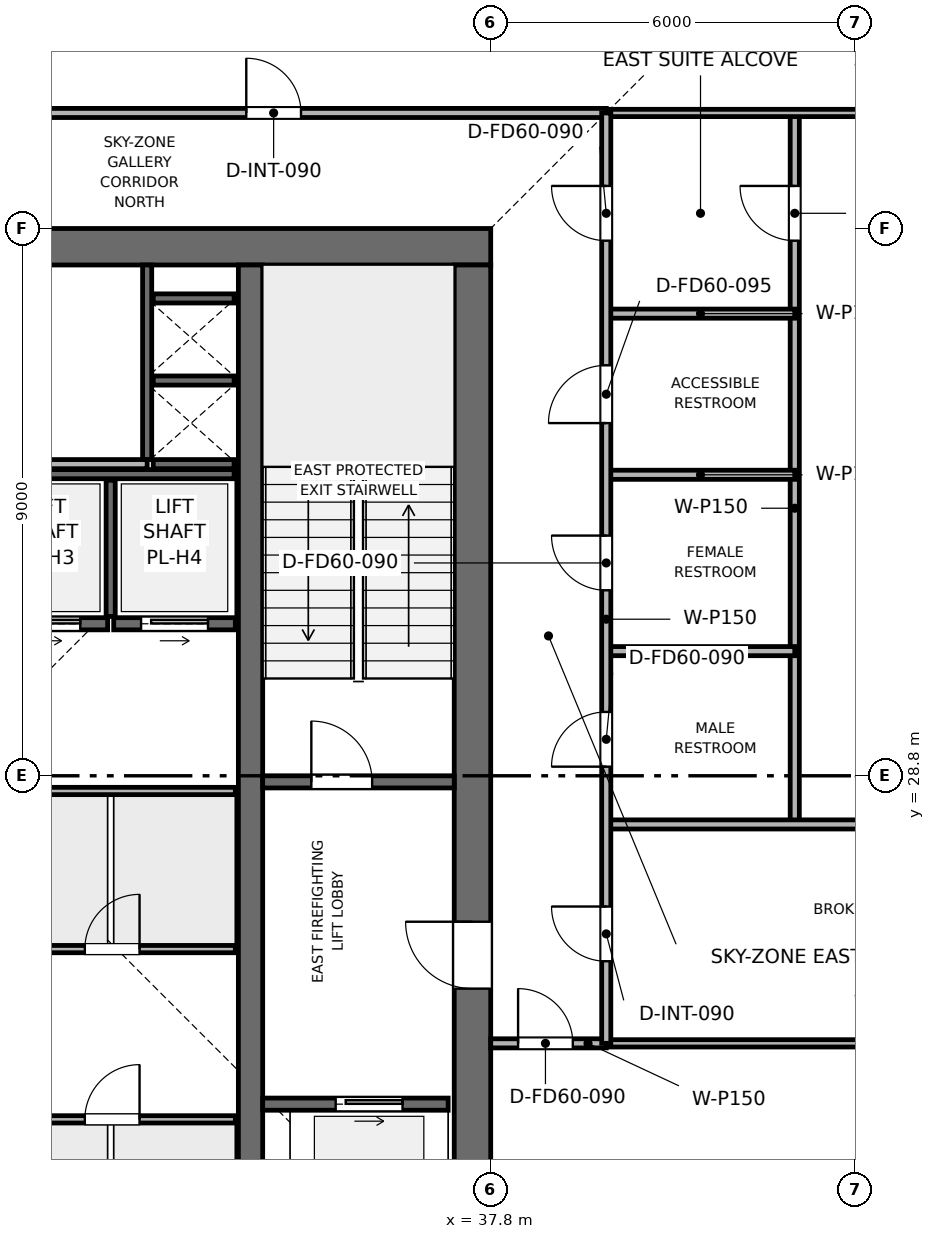
"""IFC4 building model, lengths in metres.
Left out: names, types, materials, properties, quantities, classifications, styles, units other than length and angle.
Written with IfcOpenShell. Run it as: python <this file> out.ifc"""

import sys

from ifc_helpers import new_model, si_unit, direction, frame, frame_2d, origin, place, context, subcontext, project, spatial, rectangle, extrude, element, fill, save


model = new_model("IFC4")
c1 = context("Model", 3, precision=1e-05, world=origin(), true_north=direction((0.0, 1.0)))
c2 = subcontext(c1, "Body", "Model", "MODEL_VIEW")
j1 = project(units=[si_unit("LENGTHUNIT", "METRE"), si_unit("PLANEANGLEUNIT", "RADIAN")], contexts=[c1])
p1 = place(None, origin())
s1 = spatial("IfcSite", under=j1, at=p1, CompositionType="ELEMENT")
p2 = place(p1, origin())
s2 = spatial("IfcBuilding", under=s1, at=p2, CompositionType="ELEMENT")
p3 = place(p2, frame((0.0, 0.0, 355.5)))
s3 = spatial("IfcBuildingStorey", under=s2, at=p3, CompositionType="ELEMENT", Elevation=355.5)
p4 = place(p3, frame((19.8, 37.5, 0.0), z_axis=(0.0, 0.0, 1.0), x_axis=(1.0, 0.0, 0.0)))
e1 = element("IfcWall", 1, at=p4, inside=s3, PredefinedType="SHEAR", context=c2, shape_type="SweptSolid", body=[
    extrude(rectangle(XDim=18.0, YDim=0.6, at=frame_2d((9.0, 0.0))), origin(), (0.0, 0.0, 1.0), 4.5),
])
p5 = place(p4, frame((7.05, 0.0, 0.0)))
e2 = element("IfcOpeningElement", 2, at=p5, cuts=e1, PredefinedType="OPENING", context=c2, shape_type="SweptSolid", body=[
    extrude(rectangle(XDim=1.1, YDim=2.15, at=frame_2d((0.55, 1.075))), frame((0.0, 0.31, 0.0), z_axis=(0.0, -1.0, 0.0), x_axis=(1.0, 0.0, 0.0)), (0.0, 0.0, 1.0), 0.62),
])
p6 = place(p3, frame((37.5, 20.4, 0.0), z_axis=(0.0, 0.0, 1.0), x_axis=(0.0, 1.0, 0.0)))
e3 = element("IfcWall", 3, at=p6, inside=s3, PredefinedType="SHEAR", context=c2, shape_type="SweptSolid", body=[
    extrude(rectangle(XDim=16.8, YDim=0.6, at=frame_2d((8.4, 0.0))), origin(), (0.0, 0.0, 1.0), 4.5),
])
p7 = place(p6, frame((4.9, 0.0, 0.0)))
e4 = element("IfcOpeningElement", 4, at=p7, cuts=e3, PredefinedType="OPENING", context=c2, shape_type="SweptSolid", body=[
    extrude(rectangle(XDim=1.1, YDim=2.15, at=frame_2d((0.55, 1.075))), frame((0.0, 0.31, 0.0), z_axis=(0.0, -1.0, 0.0), x_axis=(1.0, 0.0, 0.0)), (0.0, 0.0, 1.0), 0.62),
])
p8 = place(p3, frame((33.85, 20.4, 0.0), z_axis=(0.0, 0.0, 1.0), x_axis=(0.0, 1.0, 0.0)))
e5 = element("IfcWall", 5, at=p8, inside=s3, PredefinedType="SHEAR", context=c2, shape_type="SweptSolid", body=[
    extrude(rectangle(XDim=16.8, YDim=0.4, at=frame_2d((8.4, 0.0))), origin(), (0.0, 0.0, 1.0), 4.5),
])
p9 = place(p3, frame((34.05, 28.7, 0.0), z_axis=(0.0, 0.0, 1.0), x_axis=(1.0, 0.0, 0.0)))
e6 = element("IfcWall", 6, at=p9, inside=s3, PredefinedType="SHEAR", context=c2, shape_type="SweptSolid", body=[
    extrude(rectangle(XDim=3.15, YDim=0.2, at=frame_2d((1.575, 0.0))), origin(), (0.0, 0.0, 1.0), 4.24),
])
p10 = place(p9, frame((0.8, 0.0, 0.0)))
e7 = element("IfcOpeningElement", 7, at=p10, cuts=e6, PredefinedType="OPENING", context=c2, shape_type="SweptSolid", body=[
    extrude(rectangle(XDim=1.0, YDim=2.1, at=frame_2d((0.5, 1.05))), frame((0.0, 0.11, 0.0), z_axis=(0.0, -1.0, 0.0), x_axis=(1.0, 0.0, 0.0)), (0.0, 0.0, 1.0), 0.22),
])
p11 = place(p3, frame((32.15, 34.0, 0.0), z_axis=(0.0, 0.0, 1.0), x_axis=(0.0, 1.0, 0.0)))
e8 = element("IfcWall", 8, at=p11, inside=s3, PredefinedType="SHEAR", context=c2, shape_type="SweptSolid", body=[
    extrude(rectangle(XDim=3.2, YDim=0.15, at=frame_2d((1.6, 0.0))), origin(), (0.0, 0.0, 1.0), 4.24),
])
for number, where, z_axis, x_axis in (
    (9, (32.25, 33.925, 0.0), (0.0, 0.0, 1.0), (1.0, 0.0, 0.0)),
    (10, (32.25, 35.3, 0.0), (0.0, 0.0, 1.0), (1.0, 0.0, 0.0)),
):
    element("IfcWall", number, at=place(p3, frame(where, z_axis=z_axis, x_axis=x_axis)), inside=s3, PredefinedType="SHEAR", context=c2, shape_type="SweptSolid", body=[
        extrude(rectangle(XDim=1.33, YDim=0.15, at=frame_2d((0.665, 0.0))), origin(), (0.0, 0.0, 1.0), 4.24),
    ])
p12 = place(p3, frame((34.05, 23.4, 0.0), z_axis=(0.0, 0.0, 1.0), x_axis=(1.0, 0.0, 0.0)))
e11 = element("IfcWall", 11, at=p12, inside=s3, PredefinedType="SHEAR", context=c2, shape_type="SweptSolid", body=[
    extrude(rectangle(XDim=3.05, YDim=0.2, at=frame_2d((1.525, 0.0))), origin(), (0.0, 0.0, 1.0), 4.24),
])
p13 = place(p12, frame((1.2, 0.0, 0.0)))
e12 = element("IfcOpeningElement", 12, at=p13, cuts=e11, PredefinedType="OPENING", context=c2, shape_type="SweptSolid", body=[
    extrude(rectangle(XDim=1.1, YDim=2.15, at=frame_2d((0.55, 1.075))), frame((0.0, 0.11, 0.0), z_axis=(0.0, -1.0, 0.0), x_axis=(1.0, 0.0, 0.0)), (0.0, 0.0, 1.0), 0.22),
])
p14 = place(p3, frame((29.5, 31.3, 0.0), z_axis=(0.0, 0.0, 1.0), x_axis=(1.0, 0.0, 0.0)))
e13 = element("IfcWall", 13, at=p14, inside=s3, PredefinedType="SHEAR", context=c2, shape_type="SweptSolid", body=[
    extrude(rectangle(XDim=2.0, YDim=0.2, at=frame_2d((1.0, 0.0))), origin(), (0.0, 0.0, 1.0), 4.24),
])
p15 = place(p14, frame((0.45, 0.0, 0.0)))
e14 = element("IfcOpeningElement", 14, at=p15, cuts=e13, PredefinedType="OPENING", context=c2, shape_type="SweptSolid", body=[
    extrude(rectangle(XDim=1.1, YDim=2.15, at=frame_2d((0.55, 1.075))), frame((0.0, 0.11, 0.0), z_axis=(0.0, -1.0, 0.0), x_axis=(1.0, 0.0, 0.0)), (0.0, 0.0, 1.0), 0.22),
])
p16 = place(p3, frame((31.6, 31.3, 0.0), z_axis=(0.0, 0.0, 1.0), x_axis=(1.0, 0.0, 0.0)))
e15 = element("IfcWall", 15, at=p16, inside=s3, PredefinedType="SHEAR", context=c2, shape_type="SweptSolid", body=[
    extrude(rectangle(XDim=2.0, YDim=0.2, at=frame_2d((1.0, 0.0))), origin(), (0.0, 0.0, 1.0), 4.24),
])
p17 = place(p16, frame((0.45, 0.0, 0.0)))
e16 = element("IfcOpeningElement", 16, at=p17, cuts=e15, PredefinedType="OPENING", context=c2, shape_type="SweptSolid", body=[
    extrude(rectangle(XDim=1.1, YDim=2.15, at=frame_2d((0.55, 1.075))), frame((0.0, 0.11, 0.0), z_axis=(0.0, -1.0, 0.0), x_axis=(1.0, 0.0, 0.0)), (0.0, 0.0, 1.0), 0.22),
])
p18 = place(p3, frame((32.25, 36.65, 0.0), z_axis=(0.0, 0.0, 1.0), x_axis=(1.0, 0.0, 0.0)))
e17 = element("IfcWall", 17, at=p18, inside=s3, PredefinedType="SHEAR", context=c2, shape_type="SweptSolid", body=[
    extrude(rectangle(XDim=1.33, YDim=0.15, at=frame_2d((0.665, 0.0))), origin(), (0.0, 0.0, 1.0), 4.24),
])
p19 = place(p3, frame((29.5, 33.76, 0.0), z_axis=(0.0, 0.0, 1.0), x_axis=(1.0, 0.0, 0.0)))
e18 = element("IfcWall", 18, at=p19, inside=s3, PredefinedType="SHEAR", context=c2, shape_type="SweptSolid", body=[
    extrude(rectangle(XDim=4.08, YDim=0.15, at=frame_2d((2.04, 0.0))), origin(), (0.0, 0.0, 1.0), 4.24),
])
p20 = place(p3, frame((31.55, 31.42, 0.0), z_axis=(0.0, 0.0, 1.0), x_axis=(0.0, 1.0, 0.0)))
e19 = element("IfcWall", 19, at=p20, inside=s3, PredefinedType="SHEAR", context=c2, shape_type="SweptSolid", body=[
    extrude(rectangle(XDim=2.24, YDim=0.15, at=frame_2d((1.12, 0.0))), origin(), (0.0, 0.0, 1.0), 4.24),
])
p21 = place(p3, frame((29.525, 33.925, 0.0), z_axis=(0.0, 0.0, 1.0), x_axis=(1.0, 0.0, 0.0)))
e20 = element("IfcWall", 20, at=p21, inside=s3, PredefinedType="PARTITIONING", context=c2, shape_type="SweptSolid", body=[
    extrude(rectangle(XDim=2.625, YDim=0.15, at=frame_2d((1.312, 0.0))), origin(), (0.0, 0.0, 1.0), 4.24),
])
p22 = place(p3, frame((29.55, 23.15, 0.0), z_axis=(0.0, 0.0, 1.0), x_axis=(1.0, 0.0, 0.0)))
e21 = element("IfcWall", 21, at=p22, inside=s3, PredefinedType="PARTITIONING", context=c2, shape_type="SweptSolid", body=[
    extrude(rectangle(XDim=4.05, YDim=0.12, at=frame_2d((2.025, 0.0))), origin(), (0.0, 0.0, 1.0), 4.24),
])
p23 = place(p22, frame((1.575, 0.0, 0.0)))
e22 = element("IfcOpeningElement", 22, at=p23, cuts=e21, PredefinedType="OPENING", context=c2, shape_type="SweptSolid", body=[
    extrude(rectangle(XDim=0.9, YDim=2.1, at=frame_2d((0.45, 1.05))), frame((0.0, 0.07, 0.0), z_axis=(0.0, -1.0, 0.0), x_axis=(1.0, 0.0, 0.0)), (0.0, 0.0, 1.0), 0.14),
])
p24 = place(p3, frame((29.55, 25.95, 0.0), z_axis=(0.0, 0.0, 1.0), x_axis=(1.0, 0.0, 0.0)))
e23 = element("IfcWall", 23, at=p24, inside=s3, PredefinedType="PARTITIONING", context=c2, shape_type="SweptSolid", body=[
    extrude(rectangle(XDim=4.05, YDim=0.12, at=frame_2d((2.025, 0.0))), origin(), (0.0, 0.0, 1.0), 4.24),
])
p25 = place(p24, frame((1.575, 0.0, 0.0)))
e24 = element("IfcOpeningElement", 24, at=p25, cuts=e23, PredefinedType="OPENING", context=c2, shape_type="SweptSolid", body=[
    extrude(rectangle(XDim=0.9, YDim=2.1, at=frame_2d((0.45, 1.05))), frame((0.0, 0.07, 0.0), z_axis=(0.0, -1.0, 0.0), x_axis=(1.0, 0.0, 0.0)), (0.0, 0.0, 1.0), 0.14),
])
p26 = place(p3, frame((29.55, 28.55, 0.0), z_axis=(0.0, 0.0, 1.0), x_axis=(1.0, 0.0, 0.0)))
e25 = element("IfcWall", 25, at=p26, inside=s3, PredefinedType="PARTITIONING", context=c2, shape_type="SweptSolid", body=[
    extrude(rectangle(XDim=4.05, YDim=0.12, at=frame_2d((2.025, 0.0))), origin(), (0.0, 0.0, 1.0), 4.24),
])
p27 = place(p3, frame((37.8, 24.4, 0.0), z_axis=(0.0, 0.0, 1.0), x_axis=(1.0, 0.0, 0.0)))
e26 = element("IfcWall", 26, at=p27, inside=s3, PredefinedType="PARTITIONING", context=c2, shape_type="SweptSolid", body=[
    extrude(rectangle(XDim=1.9, YDim=0.15, at=frame_2d((0.95, 0.0))), origin(), (0.0, 0.0, 1.0), 4.24),
])
p28 = place(p27, frame((0.45, 0.0, 0.0)))
e27 = element("IfcOpeningElement", 27, at=p28, cuts=e26, PredefinedType="OPENING", context=c2, shape_type="SweptSolid", body=[
    extrude(rectangle(XDim=0.9, YDim=2.1, at=frame_2d((0.45, 1.05))), frame((0.0, 0.085, 0.0), z_axis=(0.0, -1.0, 0.0), x_axis=(1.0, 0.0, 0.0)), (0.0, 0.0, 1.0), 0.17),
])
p29 = place(p3, frame((39.7, 24.4, 0.0), z_axis=(0.0, 0.0, 1.0), x_axis=(1.0, 0.0, 0.0)))
e28 = element("IfcWall", 28, at=p29, inside=s3, PredefinedType="PARTITIONING", context=c2, shape_type="SweptSolid", body=[
    extrude(rectangle(XDim=9.37, YDim=0.12, at=frame_2d((4.685, 0.0))), origin(), (0.0, 0.0, 1.0), 3.865),
])
p30 = place(p3, frame((42.8, 28.0, 0.0), z_axis=(0.0, 0.0, 1.0), x_axis=(0.0, 1.0, 0.0)))
e29 = element("IfcWall", 29, at=p30, inside=s3, PredefinedType="PARTITIONING", context=c2, shape_type="SweptSolid", body=[
    extrude(rectangle(XDim=11.7, YDim=0.15, at=frame_2d((5.85, 0.0))), origin(), (0.0, 0.0, 1.0), 3.825),
])
p31 = place(p30, frame((9.6, 0.0, 0.0)))
e30 = element("IfcOpeningElement", 30, at=p31, cuts=e29, PredefinedType="OPENING", context=c2, shape_type="SweptSolid", body=[
    extrude(rectangle(XDim=0.9, YDim=2.1, at=frame_2d((0.45, 1.05))), frame((0.0, 0.085, 0.0), z_axis=(0.0, -1.0, 0.0), x_axis=(1.0, 0.0, 0.0)), (0.0, 0.0, 1.0), 0.17),
])
p32 = place(p3, frame((39.7, 28.0, 0.0), z_axis=(0.0, 0.0, 1.0), x_axis=(1.0, 0.0, 0.0)))
e31 = element("IfcWall", 31, at=p32, inside=s3, PredefinedType="PARTITIONING", context=c2, shape_type="SweptSolid", body=[
    extrude(rectangle(XDim=9.37, YDim=0.15, at=frame_2d((4.685, 0.0))), origin(), (0.0, 0.0, 1.0), 3.865),
])
for number, where, z_axis, x_axis in (
    (32, (39.7, 36.4, 0.0), (0.0, 0.0, 1.0), (1.0, 0.0, 0.0)),
    (33, (39.7, 30.85, 0.0), (0.0, 0.0, 1.0), (1.0, 0.0, 0.0)),
    (34, (39.7, 33.75, 0.0), (0.0, 0.0, 1.0), (1.0, 0.0, 0.0)),
):
    element("IfcWall", number, at=place(p3, frame(where, z_axis=z_axis, x_axis=x_axis)), inside=s3, PredefinedType="PARTITIONING", context=c2, shape_type="SweptSolid", body=[
        extrude(rectangle(XDim=3.1, YDim=0.15, at=frame_2d((1.55, 0.0))), origin(), (0.0, 0.0, 1.0), 3.865),
    ])
p33 = place(p3, frame((39.7, 39.7, 0.0), z_axis=(0.0, 0.0, 1.0), x_axis=(1.0, 0.0, 0.0)))
e35 = element("IfcWall", 35, at=p33, inside=s3, PredefinedType="PARTITIONING", context=c2, shape_type="SweptSolid", body=[
    extrude(rectangle(XDim=9.37, YDim=0.12, at=frame_2d((4.685, 0.0))), origin(), (0.0, 0.0, 1.0), 3.825),
])
p34 = place(p3, frame((17.9, 39.7, 0.0), z_axis=(0.0, 0.0, 1.0), x_axis=(1.0, 0.0, 0.0)))
e36 = element("IfcWall", 36, at=p34, inside=s3, PredefinedType="PARTITIONING", context=c2, shape_type="SweptSolid", body=[
    extrude(rectangle(XDim=21.8, YDim=0.15, at=frame_2d((10.9, 0.0))), origin(), (0.0, 0.0, 1.0), 3.825),
])
p35 = place(p34, frame((0.765, 0.0, 0.0)))
e37 = element("IfcOpeningElement", 37, at=p35, cuts=e36, PredefinedType="OPENING", context=c2, shape_type="SweptSolid", body=[
    extrude(rectangle(XDim=0.9, YDim=2.1, at=frame_2d((0.45, 1.05))), frame((0.0, 0.085, 0.0), z_axis=(0.0, -1.0, 0.0), x_axis=(1.0, 0.0, 0.0)), (0.0, 0.0, 1.0), 0.17),
])
p36 = place(p34, frame((6.195, 0.0, 0.0)))
e38 = element("IfcOpeningElement", 38, at=p36, cuts=e36, PredefinedType="OPENING", context=c2, shape_type="SweptSolid", body=[
    extrude(rectangle(XDim=0.9, YDim=2.1, at=frame_2d((0.45, 1.05))), frame((0.0, 0.085, 0.0), z_axis=(0.0, -1.0, 0.0), x_axis=(1.0, 0.0, 0.0)), (0.0, 0.0, 1.0), 0.17),
])
p37 = place(p34, frame((15.88, 0.0, 0.0)))
e39 = element("IfcOpeningElement", 39, at=p37, cuts=e36, PredefinedType="OPENING", context=c2, shape_type="SweptSolid", body=[
    extrude(rectangle(XDim=0.9, YDim=2.1, at=frame_2d((0.45, 1.05))), frame((0.0, 0.085, 0.0), z_axis=(0.0, -1.0, 0.0), x_axis=(1.0, 0.0, 0.0)), (0.0, 0.0, 1.0), 0.17),
])
p38 = place(p3, frame((39.7, 24.4, 0.0), z_axis=(0.0, 0.0, 1.0), x_axis=(0.0, 1.0, 0.0)))
e40 = element("IfcWall", 40, at=p38, inside=s3, PredefinedType="PARTITIONING", context=c2, shape_type="SweptSolid", body=[
    extrude(rectangle(XDim=15.3, YDim=0.15, at=frame_2d((7.65, 0.0))), origin(), (0.0, 0.0, 1.0), 3.825),
])
p39 = place(p38, frame((1.35, 0.0, 0.0)))
e41 = element("IfcOpeningElement", 41, at=p39, cuts=e40, PredefinedType="OPENING", context=c2, shape_type="SweptSolid", body=[
    extrude(rectangle(XDim=0.9, YDim=2.1, at=frame_2d((0.45, 1.05))), frame((0.0, 0.085, 0.0), z_axis=(0.0, -1.0, 0.0), x_axis=(1.0, 0.0, 0.0)), (0.0, 0.0, 1.0), 0.17),
])
p40 = place(p38, frame((4.55, 0.0, 0.0)))
e42 = element("IfcOpeningElement", 42, at=p40, cuts=e40, PredefinedType="OPENING", context=c2, shape_type="SweptSolid", body=[
    extrude(rectangle(XDim=0.9, YDim=2.1, at=frame_2d((0.45, 1.05))), frame((0.0, 0.085, 0.0), z_axis=(0.0, -1.0, 0.0), x_axis=(1.0, 0.0, 0.0)), (0.0, 0.0, 1.0), 0.17),
])
p41 = place(p38, frame((7.45, 0.0, 0.0)))
e43 = element("IfcOpeningElement", 43, at=p41, cuts=e40, PredefinedType="OPENING", context=c2, shape_type="SweptSolid", body=[
    extrude(rectangle(XDim=0.9, YDim=2.1, at=frame_2d((0.45, 1.05))), frame((0.0, 0.085, 0.0), z_axis=(0.0, -1.0, 0.0), x_axis=(1.0, 0.0, 0.0)), (0.0, 0.0, 1.0), 0.17),
])
p42 = place(p38, frame((10.2, 0.0, 0.0)))
e44 = element("IfcOpeningElement", 44, at=p42, cuts=e40, PredefinedType="OPENING", context=c2, shape_type="SweptSolid", body=[
    extrude(rectangle(XDim=0.95, YDim=2.1, at=frame_2d((0.475, 1.05))), frame((0.0, 0.085, 0.0), z_axis=(0.0, -1.0, 0.0), x_axis=(1.0, 0.0, 0.0)), (0.0, 0.0, 1.0), 0.17),
])
p43 = place(p38, frame((13.2, 0.0, 0.0)))
e45 = element("IfcOpeningElement", 45, at=p43, cuts=e40, PredefinedType="OPENING", context=c2, shape_type="SweptSolid", body=[
    extrude(rectangle(XDim=0.9, YDim=2.1, at=frame_2d((0.45, 1.05))), frame((0.0, 0.085, 0.0), z_axis=(0.0, -1.0, 0.0), x_axis=(1.0, 0.0, 0.0)), (0.0, 0.0, 1.0), 0.17),
])
p44 = place(p10, origin())
e46 = element("IfcDoor", 46, at=p44, inside=s3, OperationType="SINGLE_SWING_LEFT", PredefinedType="DOOR", context=c2, shape_type="SweptSolid", body=[
    extrude(rectangle(XDim=1.0, YDim=2.1, at=frame_2d((0.5, 1.05))), frame((0.0, 0.025, 0.0), z_axis=(0.0, -1.0, 0.0), x_axis=(1.0, 0.0, 0.0)), (0.0, 0.0, 1.0), 0.05),
])
fill(e7, e46)
p45 = place(p13, origin())
e47 = element("IfcDoor", 47, at=p45, inside=s3, OperationType="SLIDING_TO_RIGHT", PredefinedType="DOOR", context=c2, shape_type="SweptSolid", body=[
    extrude(rectangle(XDim=1.1, YDim=2.15, at=frame_2d((0.55, 1.075))), frame((0.0, 0.025, 0.0), z_axis=(0.0, -1.0, 0.0), x_axis=(1.0, 0.0, 0.0)), (0.0, 0.0, 1.0), 0.05),
])
fill(e12, e47)
p46 = place(p15, origin())
e48 = element("IfcDoor", 48, at=p46, inside=s3, OperationType="SLIDING_TO_RIGHT", PredefinedType="DOOR", context=c2, shape_type="SweptSolid", body=[
    extrude(rectangle(XDim=1.1, YDim=2.15, at=frame_2d((0.55, 1.075))), frame((0.0, 0.025, 0.0), z_axis=(0.0, -1.0, 0.0), x_axis=(1.0, 0.0, 0.0)), (0.0, 0.0, 1.0), 0.05),
])
fill(e14, e48)
p47 = place(p17, origin())
e49 = element("IfcDoor", 49, at=p47, inside=s3, OperationType="SLIDING_TO_RIGHT", PredefinedType="DOOR", context=c2, shape_type="SweptSolid", body=[
    extrude(rectangle(XDim=1.1, YDim=2.15, at=frame_2d((0.55, 1.075))), frame((0.0, 0.025, 0.0), z_axis=(0.0, -1.0, 0.0), x_axis=(1.0, 0.0, 0.0)), (0.0, 0.0, 1.0), 0.05),
])
fill(e16, e49)
p48 = place(p23, origin())
e50 = element("IfcDoor", 50, at=p48, inside=s3, OperationType="SINGLE_SWING_RIGHT", PredefinedType="DOOR", context=c2, shape_type="SweptSolid", body=[
    extrude(rectangle(XDim=0.9, YDim=2.1, at=frame_2d((0.45, 1.05))), frame((0.0, 0.025, 0.0), z_axis=(0.0, -1.0, 0.0), x_axis=(1.0, 0.0, 0.0)), (0.0, 0.0, 1.0), 0.05),
])
fill(e22, e50)
p49 = place(p25, origin())
e51 = element("IfcDoor", 51, at=p49, inside=s3, OperationType="SINGLE_SWING_RIGHT", PredefinedType="DOOR", context=c2, shape_type="SweptSolid", body=[
    extrude(rectangle(XDim=0.9, YDim=2.1, at=frame_2d((0.45, 1.05))), frame((0.0, 0.025, 0.0), z_axis=(0.0, -1.0, 0.0), x_axis=(1.0, 0.0, 0.0)), (0.0, 0.0, 1.0), 0.05),
])
fill(e24, e51)
p50 = place(p28, origin())
e52 = element("IfcDoor", 52, at=p50, inside=s3, OperationType="SINGLE_SWING_LEFT", PredefinedType="DOOR", context=c2, shape_type="SweptSolid", body=[
    extrude(rectangle(XDim=0.9, YDim=2.1, at=frame_2d((0.45, 1.05))), frame((0.0, 0.025, 0.0), z_axis=(0.0, -1.0, 0.0), x_axis=(1.0, 0.0, 0.0)), (0.0, 0.0, 1.0), 0.05),
])
fill(e27, e52)
p51 = place(p31, origin())
e53 = element("IfcDoor", 53, at=p51, inside=s3, OperationType="SINGLE_SWING_RIGHT", PredefinedType="DOOR", context=c2, shape_type="SweptSolid", body=[
    extrude(rectangle(XDim=0.9, YDim=2.1, at=frame_2d((0.45, 1.05))), frame((0.0, 0.025, 0.0), z_axis=(0.0, -1.0, 0.0), x_axis=(1.0, 0.0, 0.0)), (0.0, 0.0, 1.0), 0.05),
])
fill(e30, e53)
p52 = place(p37, origin())
e54 = element("IfcDoor", 54, at=p52, inside=s3, OperationType="SINGLE_SWING_LEFT", PredefinedType="DOOR", context=c2, shape_type="SweptSolid", body=[
    extrude(rectangle(XDim=0.9, YDim=2.1, at=frame_2d((0.45, 1.05))), frame((0.0, 0.025, 0.0), z_axis=(0.0, -1.0, 0.0), x_axis=(1.0, 0.0, 0.0)), (0.0, 0.0, 1.0), 0.05),
])
fill(e39, e54)
p53 = place(p39, origin())
e55 = element("IfcDoor", 55, at=p53, inside=s3, OperationType="SINGLE_SWING_RIGHT", PredefinedType="DOOR", context=c2, shape_type="SweptSolid", body=[
    extrude(rectangle(XDim=0.9, YDim=2.1, at=frame_2d((0.45, 1.05))), frame((0.0, 0.025, 0.0), z_axis=(0.0, -1.0, 0.0), x_axis=(1.0, 0.0, 0.0)), (0.0, 0.0, 1.0), 0.05),
])
fill(e41, e55)
p54 = place(p40, origin())
e56 = element("IfcDoor", 56, at=p54, inside=s3, OperationType="SINGLE_SWING_LEFT", PredefinedType="DOOR", context=c2, shape_type="SweptSolid", body=[
    extrude(rectangle(XDim=0.9, YDim=2.1, at=frame_2d((0.45, 1.05))), frame((0.0, 0.025, 0.0), z_axis=(0.0, -1.0, 0.0), x_axis=(1.0, 0.0, 0.0)), (0.0, 0.0, 1.0), 0.05),
])
fill(e42, e56)
p55 = place(p41, origin())
e57 = element("IfcDoor", 57, at=p55, inside=s3, OperationType="SINGLE_SWING_RIGHT", PredefinedType="DOOR", context=c2, shape_type="SweptSolid", body=[
    extrude(rectangle(XDim=0.9, YDim=2.1, at=frame_2d((0.45, 1.05))), frame((0.0, 0.025, 0.0), z_axis=(0.0, -1.0, 0.0), x_axis=(1.0, 0.0, 0.0)), (0.0, 0.0, 1.0), 0.05),
])
fill(e43, e57)
p56 = place(p42, origin())
e58 = element("IfcDoor", 58, at=p56, inside=s3, OperationType="SINGLE_SWING_LEFT", PredefinedType="DOOR", context=c2, shape_type="SweptSolid", body=[
    extrude(rectangle(XDim=0.95, YDim=2.1, at=frame_2d((0.475, 1.05))), frame((0.0, 0.025, 0.0), z_axis=(0.0, -1.0, 0.0), x_axis=(1.0, 0.0, 0.0)), (0.0, 0.0, 1.0), 0.05),
])
fill(e44, e58)
p57 = place(p43, origin())
e59 = element("IfcDoor", 59, at=p57, inside=s3, OperationType="SINGLE_SWING_RIGHT", PredefinedType="DOOR", context=c2, shape_type="SweptSolid", body=[
    extrude(rectangle(XDim=0.9, YDim=2.1, at=frame_2d((0.45, 1.05))), frame((0.0, 0.025, 0.0), z_axis=(0.0, -1.0, 0.0), x_axis=(1.0, 0.0, 0.0)), (0.0, 0.0, 1.0), 0.05),
])
fill(e45, e59)
p58 = place(p7, origin())
e60 = element("IfcDoor", 60, at=p58, inside=s3, OperationType="SINGLE_SWING_RIGHT", PredefinedType="DOOR", context=c2, shape_type="SweptSolid", body=[
    extrude(rectangle(XDim=1.1, YDim=2.15, at=frame_2d((0.55, 1.075))), frame((0.0, 0.025, 0.0), z_axis=(0.0, -1.0, 0.0), x_axis=(1.0, 0.0, 0.0)), (0.0, 0.0, 1.0), 0.05),
])
fill(e4, e60)
save(model, sys.argv[1])
